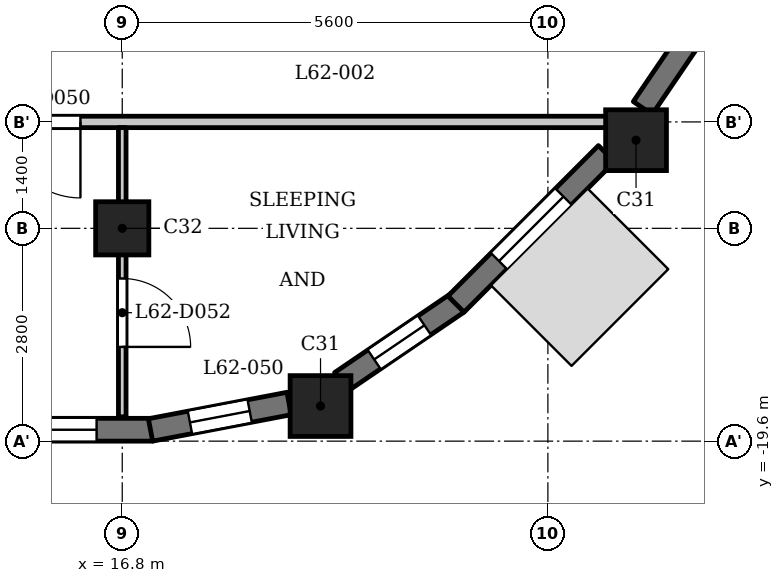
"""IFC4 building model, lengths in metres.
Left out: names, types, materials, properties, quantities, classifications, styles, units other than length and angle.
Written with IfcOpenShell. Run it as: python <this file> out.ifc"""

import sys

from ifc_helpers import new_model, si_unit, direction, frame, frame_2d, origin, origin_2d, place, context, subcontext, project, spatial, rectangle, extrude, element, fill, save


model = new_model("IFC4")
c1 = context("Model", 3, precision=1e-05, world=origin(), true_north=direction((0.0, 1.0)))
c2 = subcontext(c1, "Body", "Model", "MODEL_VIEW")
j1 = project(units=[si_unit("LENGTHUNIT", "METRE"), si_unit("PLANEANGLEUNIT", "RADIAN")], contexts=[c1])
p1 = place(None, origin())
s1 = spatial("IfcSite", under=j1, at=p1, CompositionType="ELEMENT")
p2 = place(p1, origin())
s2 = spatial("IfcBuilding", under=s1, at=p2, CompositionType="ELEMENT")
p3 = place(p2, frame((0.0, 0.0, 241.7)))
s3 = spatial("IfcBuildingStorey", under=s2, at=p3, CompositionType="ELEMENT", Elevation=241.7)
for number, where, z_axis, x_axis in (
    (1, (19.409, -19.138, 0.0), (0.0, 0.0, 1.0), (1.0, 0.0, 0.0)),
    (2, (23.56, -15.64, 0.0), (0.0, 0.0, 1.0), (1.0, 0.0, 0.0)),
):
    element("IfcColumn", number, at=place(p3, frame(where, z_axis=z_axis, x_axis=x_axis)), inside=s3, PredefinedType="COLUMN", context=c2, shape_type="SweptSolid", body=[
        extrude(rectangle(XDim=0.8, YDim=0.8, at=origin_2d()), origin(), (0.0, 0.0, 1.0), 3.5),
    ])
p4 = place(p3, frame((16.8, -16.8, 0.0), z_axis=(0.0, 0.0, 1.0), x_axis=(1.0, 0.0, 0.0)))
e3 = element("IfcColumn", 3, at=p4, inside=s3, PredefinedType="COLUMN", context=c2, shape_type="SweptSolid", body=[
    extrude(rectangle(XDim=0.7, YDim=0.7, at=origin_2d()), origin(), (0.0, 0.0, 1.0), 3.5),
])
p5 = place(p3, frame((14.4, -19.45, 0.0), z_axis=(0.0, 0.0, 1.0), x_axis=(1.0, 0.0, 0.0)))
e4 = element("IfcWall", 4, at=p5, inside=s3, PredefinedType="SOLIDWALL", context=c2, shape_type="SweptSolid", body=[
    extrude(rectangle(XDim=2.8, YDim=0.3, at=frame_2d((1.4, 0.0))), origin(), (0.0, 0.0, 1.0), 2.55),
])
p6 = place(p5, frame((0.262, 0.0, 0.9)))
e5 = element("IfcOpeningElement", 5, at=p6, cuts=e4, PredefinedType="OPENING", context=c2, shape_type="SweptSolid", body=[
    extrude(rectangle(XDim=1.8, YDim=1.25, at=frame_2d((0.9, 0.625))), frame((0.0, 0.16, 0.0), z_axis=(0.0, -1.0, 0.0), x_axis=(1.0, 0.0, 0.0)), (0.0, 0.0, 1.0), 0.32),
])
p7 = place(p3, frame((17.172, -19.453, 0.0), z_axis=(0.0, 0.0, 1.0), x_axis=(0.982301706131, 0.187305520826, 0.0)))
e6 = element("IfcWall", 6, at=p7, inside=s3, PredefinedType="SOLIDWALL", context=c2, shape_type="SweptSolid", body=[
    extrude(rectangle(XDim=1.856, YDim=0.3, at=frame_2d((0.928, 0.0))), origin(), (0.0, 0.0, 1.0), 2.55),
])
p8 = place(p7, frame((0.528, 0.0, 0.6)))
e7 = element("IfcOpeningElement", 7, at=p8, cuts=e6, PredefinedType="OPENING", context=c2, shape_type="SweptSolid", body=[
    extrude(rectangle(XDim=0.8, YDim=1.55, at=frame_2d((0.4, 0.775))), frame((0.0, 0.16, 0.0), z_axis=(0.0, -1.0, 0.0), x_axis=(1.0, 0.0, 0.0)), (0.0, 0.0, 1.0), 0.32),
])
p9 = place(p3, frame((19.678, -18.822, 0.0), z_axis=(0.0, 0.0, 1.0), x_axis=(0.826997446962, 0.562205676526, 0.0)))
e8 = element("IfcWall", 8, at=p9, inside=s3, PredefinedType="SOLIDWALL", context=c2, shape_type="SweptSolid", body=[
    extrude(rectangle(XDim=1.856, YDim=0.3, at=frame_2d((0.928, 0.0))), origin(), (0.0, 0.0, 1.0), 2.55),
])
p10 = place(p9, frame((0.528, 0.0, 0.6)))
e9 = element("IfcOpeningElement", 9, at=p10, cuts=e8, PredefinedType="OPENING", context=c2, shape_type="SweptSolid", body=[
    extrude(rectangle(XDim=0.8, YDim=1.55, at=frame_2d((0.4, 0.775))), frame((0.0, 0.16, 0.0), z_axis=(0.0, -1.0, 0.0), x_axis=(1.0, 0.0, 0.0)), (0.0, 0.0, 1.0), 0.32),
])
p11 = place(p3, frame((21.191, -17.797, 0.0), z_axis=(0.0, 0.0, 1.0), x_axis=(0.707106781187, 0.707106781187, 0.0)))
e10 = element("IfcWall", 10, at=p11, inside=s3, PredefinedType="SOLIDWALL", context=c2, shape_type="SweptSolid", body=[
    extrude(rectangle(XDim=2.8, YDim=0.3, at=frame_2d((1.4, 0.0))), origin(), (0.0, 0.0, 1.0), 2.55),
])
p12 = place(p11, frame((0.8, 0.0, 0.6)))
e11 = element("IfcOpeningElement", 11, at=p12, cuts=e10, PredefinedType="OPENING", context=c2, shape_type="SweptSolid", body=[
    extrude(rectangle(XDim=1.2, YDim=1.55, at=frame_2d((0.6, 0.775))), frame((0.0, 0.16, 0.0), z_axis=(0.0, -1.0, 0.0), x_axis=(1.0, 0.0, 0.0)), (0.0, 0.0, 1.0), 0.32),
])
p13 = place(p3, frame((23.648, -15.217, 0.0), z_axis=(0.0, 0.0, 1.0), x_axis=(0.562043265151, 0.827107833416, 0.0)))
e12 = element("IfcWall", 12, at=p13, inside=s3, PredefinedType="SOLIDWALL", context=c2, shape_type="SweptSolid", body=[
    extrude(rectangle(XDim=1.377, YDim=0.3, at=frame_2d((0.688, 0.0))), origin(), (0.0, 0.0, 1.0), 2.55),
])
p14 = place(p3, frame((-23.322, -15.4, 0.0), z_axis=(0.0, 0.0, 1.0), x_axis=(1.0, 0.0, 0.0)))
e13 = element("IfcWall", 13, at=p14, inside=s3, PredefinedType="PARTITIONING", context=c2, shape_type="SweptSolid", body=[
    extrude(rectangle(XDim=46.872, YDim=0.15, at=frame_2d((23.436, 0.0))), origin(), (0.0, 0.0, 1.0), 3.2),
])
p15 = place(p14, frame((7.172, 0.0, 0.0)))
e14 = element("IfcOpeningElement", 14, at=p15, cuts=e13, PredefinedType="OPENING", context=c2, shape_type="SweptSolid", body=[
    extrude(rectangle(XDim=1.0, YDim=2.1, at=frame_2d((0.5, 1.05))), frame((0.0, 0.085, 0.0), z_axis=(0.0, -1.0, 0.0), x_axis=(1.0, 0.0, 0.0)), (0.0, 0.0, 1.0), 0.17),
])
p16 = place(p14, frame((16.172, 0.0, 0.0)))
e15 = element("IfcOpeningElement", 15, at=p16, cuts=e13, PredefinedType="OPENING", context=c2, shape_type="SweptSolid", body=[
    extrude(rectangle(XDim=1.0, YDim=2.1, at=frame_2d((0.5, 1.05))), frame((0.0, 0.085, 0.0), z_axis=(0.0, -1.0, 0.0), x_axis=(1.0, 0.0, 0.0)), (0.0, 0.0, 1.0), 0.17),
])
p17 = place(p14, frame((26.372, 0.0, 0.0)))
e16 = element("IfcOpeningElement", 16, at=p17, cuts=e13, PredefinedType="OPENING", context=c2, shape_type="SweptSolid", body=[
    extrude(rectangle(XDim=1.0, YDim=2.1, at=frame_2d((0.5, 1.05))), frame((0.0, 0.085, 0.0), z_axis=(0.0, -1.0, 0.0), x_axis=(1.0, 0.0, 0.0)), (0.0, 0.0, 1.0), 0.17),
])
p18 = place(p14, frame((38.572, 0.0, 0.0)))
e17 = element("IfcOpeningElement", 17, at=p18, cuts=e13, PredefinedType="OPENING", context=c2, shape_type="SweptSolid", body=[
    extrude(rectangle(XDim=1.0, YDim=2.1, at=frame_2d((0.5, 1.05))), frame((0.0, 0.085, 0.0), z_axis=(0.0, -1.0, 0.0), x_axis=(1.0, 0.0, 0.0)), (0.0, 0.0, 1.0), 0.17),
])
p19 = place(p3, frame((16.8, -19.28, 0.0), z_axis=(0.0, 0.0, 1.0), x_axis=(0.0, 1.0, 0.0)))
e18 = element("IfcWall", 18, at=p19, inside=s3, PredefinedType="PARTITIONING", context=c2, shape_type="SweptSolid", body=[
    extrude(rectangle(XDim=3.805, YDim=0.1, at=frame_2d((1.902, 0.0))), origin(), (0.0, 0.0, 1.0), 3.2),
])
p20 = place(p19, frame((0.92, 0.0, 0.0)))
e19 = element("IfcOpeningElement", 19, at=p20, cuts=e18, PredefinedType="OPENING", context=c2, shape_type="SweptSolid", body=[
    extrude(rectangle(XDim=0.9, YDim=2.1, at=frame_2d((0.45, 1.05))), frame((0.0, 0.06, 0.0), z_axis=(0.0, -1.0, 0.0), x_axis=(1.0, 0.0, 0.0)), (0.0, 0.0, 1.0), 0.12),
])
p21 = place(p18, origin())
e20 = element("IfcDoor", 20, at=p21, inside=s3, OperationType="SINGLE_SWING_RIGHT", PredefinedType="DOOR", context=c2, shape_type="SweptSolid", body=[
    extrude(rectangle(XDim=1.0, YDim=2.1, at=frame_2d((0.5, 1.05))), frame((0.0, 0.025, 0.0), z_axis=(0.0, -1.0, 0.0), x_axis=(1.0, 0.0, 0.0)), (0.0, 0.0, 1.0), 0.05),
])
fill(e17, e20)
p22 = place(p20, origin())
e21 = element("IfcDoor", 21, at=p22, inside=s3, OperationType="SINGLE_SWING_LEFT", PredefinedType="DOOR", context=c2, shape_type="SweptSolid", body=[
    extrude(rectangle(XDim=0.9, YDim=2.1, at=frame_2d((0.45, 1.05))), frame((0.0, 0.025, 0.0), z_axis=(0.0, -1.0, 0.0), x_axis=(1.0, 0.0, 0.0)), (0.0, 0.0, 1.0), 0.05),
])
fill(e19, e21)
p23 = place(p6, origin())
e22 = element("IfcWindow", 22, at=p23, inside=s3, PartitioningType="SINGLE_PANEL", PredefinedType="WINDOW", context=c2, shape_type="SweptSolid", body=[
    extrude(rectangle(XDim=1.8, YDim=1.25, at=frame_2d((0.9, 0.625))), frame((0.0, 0.03, 0.0), z_axis=(0.0, -1.0, 0.0), x_axis=(1.0, 0.0, 0.0)), (0.0, 0.0, 1.0), 0.06),
])
fill(e5, e22)
p24 = place(p8, origin())
e23 = element("IfcWindow", 23, at=p24, inside=s3, PartitioningType="SINGLE_PANEL", PredefinedType="WINDOW", context=c2, shape_type="SweptSolid", body=[
    extrude(rectangle(XDim=0.8, YDim=1.55, at=frame_2d((0.4, 0.775))), frame((0.0, 0.03, 0.0), z_axis=(0.0, -1.0, 0.0), x_axis=(1.0, 0.0, 0.0)), (0.0, 0.0, 1.0), 0.06),
])
fill(e7, e23)
p25 = place(p10, origin())
e24 = element("IfcWindow", 24, at=p25, inside=s3, PartitioningType="SINGLE_PANEL", PredefinedType="WINDOW", context=c2, shape_type="SweptSolid", body=[
    extrude(rectangle(XDim=0.8, YDim=1.55, at=frame_2d((0.4, 0.775))), frame((0.0, 0.03, 0.0), z_axis=(0.0, -1.0, 0.0), x_axis=(1.0, 0.0, 0.0)), (0.0, 0.0, 1.0), 0.06),
])
fill(e9, e24)
p26 = place(p12, origin())
e25 = element("IfcWindow", 25, at=p26, inside=s3, PartitioningType="SINGLE_PANEL", PredefinedType="WINDOW", context=c2, shape_type="SweptSolid", body=[
    extrude(rectangle(XDim=1.2, YDim=1.55, at=frame_2d((0.6, 0.775))), frame((0.0, 0.03, 0.0), z_axis=(0.0, -1.0, 0.0), x_axis=(1.0, 0.0, 0.0)), (0.0, 0.0, 1.0), 0.06),
])
fill(e11, e25)
save(model, sys.argv[1])
